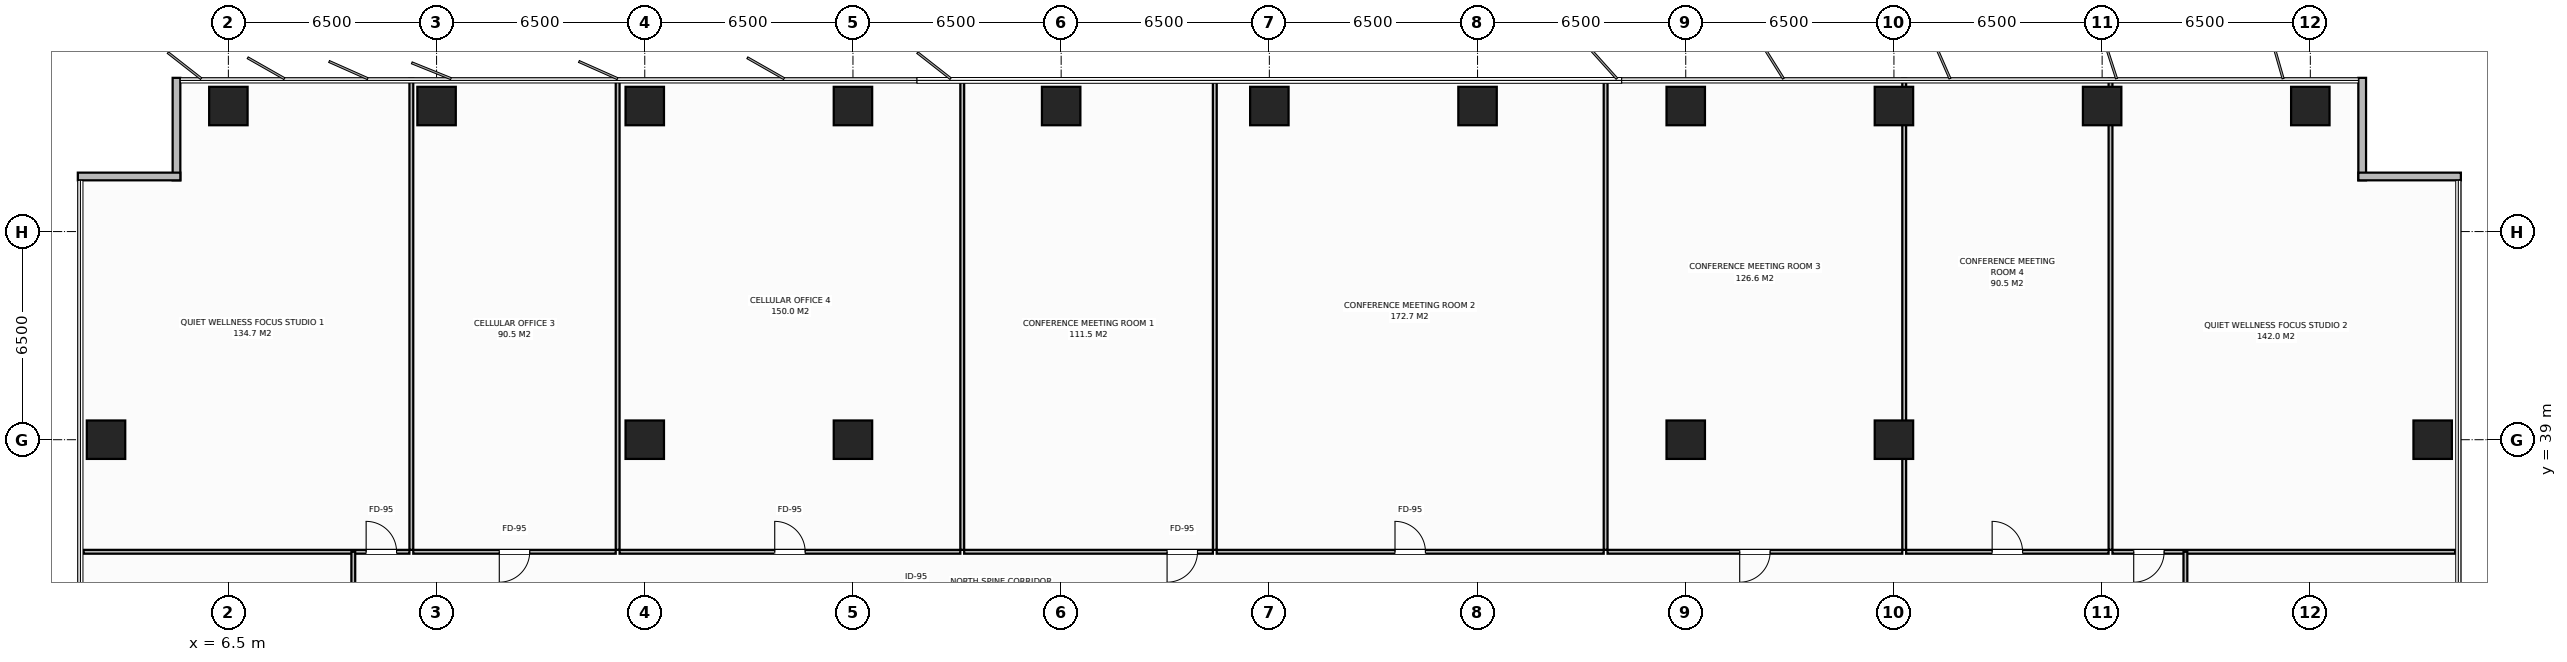
"""IFC4 building model, lengths in metres.
Left out: names, types, materials, properties, quantities, classifications, styles, units other than length and angle.
Written with IfcOpenShell. Run it as: python <this file> out.ifc"""

import sys

from ifc_helpers import new_model, si_unit, direction, frame, frame_2d, origin, origin_2d, place, context, subcontext, project, spatial, rectangle, extrude, element, fill, save


model = new_model("IFC4")
c1 = context("Model", 3, precision=1e-05, world=origin(), true_north=direction((0.0, 1.0)))
c2 = subcontext(c1, "Body", "Model", "MODEL_VIEW")
j1 = project(units=[si_unit("LENGTHUNIT", "METRE"), si_unit("PLANEANGLEUNIT", "RADIAN")], contexts=[c1])
p1 = place(None, origin())
s1 = spatial("IfcSite", under=j1, at=p1, CompositionType="ELEMENT")
p2 = place(p1, origin())
s2 = spatial("IfcBuilding", under=s1, at=p2, CompositionType="ELEMENT")
p3 = place(p2, frame((0.0, 0.0, 116.4)))
s3 = spatial("IfcBuildingStorey", under=s2, at=p3, CompositionType="ELEMENT", Elevation=116.4)
for number, where, z_axis, x_axis in (
    (1, (19.5, 39.0, 0.0), (0.0, 0.0, 1.0), (1.0, 0.0, 0.0)),
    (2, (58.5, 39.0, 0.0), (0.0, 0.0, 1.0), (1.0, 0.0, 0.0)),
    (3, (26.0, 39.0, 0.0), (0.0, 0.0, 1.0), (1.0, 0.0, 0.0)),
    (4, (52.0, 39.0, 0.0), (0.0, 0.0, 1.0), (1.0, 0.0, 0.0)),
    (5, (6.5, 49.42, 0.0), (0.0, 0.0, 1.0), (1.0, 0.0, 0.0)),
    (6, (13.0, 49.42, 0.0), (0.0, 0.0, 1.0), (1.0, 0.0, 0.0)),
    (7, (19.5, 49.42, 0.0), (0.0, 0.0, 1.0), (1.0, 0.0, 0.0)),
    (8, (26.0, 49.42, 0.0), (0.0, 0.0, 1.0), (1.0, 0.0, 0.0)),
    (9, (32.5, 49.42, 0.0), (0.0, 0.0, 1.0), (1.0, 0.0, 0.0)),
    (10, (39.0, 49.42, 0.0), (0.0, 0.0, 1.0), (1.0, 0.0, 0.0)),
    (11, (45.5, 49.42, 0.0), (0.0, 0.0, 1.0), (1.0, 0.0, 0.0)),
    (12, (52.0, 49.42, 0.0), (0.0, 0.0, 1.0), (1.0, 0.0, 0.0)),
    (13, (58.5, 49.42, 0.0), (0.0, 0.0, 1.0), (1.0, 0.0, 0.0)),
    (14, (65.0, 49.42, 0.0), (0.0, 0.0, 1.0), (1.0, 0.0, 0.0)),
    (15, (71.5, 49.42, 0.0), (0.0, 0.0, 1.0), (1.0, 0.0, 0.0)),
    (16, (2.68, 39.0, 0.0), (0.0, 0.0, 1.0), (1.0, 0.0, 0.0)),
    (17, (75.32, 39.0, 0.0), (0.0, 0.0, 1.0), (1.0, 0.0, 0.0)),
):
    element("IfcColumn", number, at=place(p3, frame(where, z_axis=z_axis, x_axis=x_axis)), inside=s3, PredefinedType="COLUMN", context=c2, shape_type="SweptSolid", body=[
        extrude(rectangle(XDim=1.2, YDim=1.2, at=origin_2d()), origin(), (0.0, 0.0, 1.0), 3.8),
    ])
for number, where, z_axis, x_axis in (
    (18, (4.88, 47.1, 0.0), (0.0, 0.0, 1.0), (0.0, 1.0, 0.0)),
    (19, (1.8, 47.22, 0.0), (0.0, 0.0, 1.0), (1.0, 0.0, 0.0)),
    (20, (73.12, 50.3, 0.0), (0.0, 0.0, 1.0), (0.0, -1.0, 0.0)),
    (21, (73.0, 47.22, 0.0), (0.0, 0.0, 1.0), (1.0, 0.0, 0.0)),
):
    element("IfcWall", number, at=place(p3, frame(where, z_axis=z_axis, x_axis=x_axis)), inside=s3, PredefinedType="STANDARD", context=c2, shape_type="SweptSolid", body=[
        extrude(rectangle(XDim=3.2, YDim=0.24, at=frame_2d((1.6, 0.0))), origin(), (0.0, 0.0, 1.0), 3.565),
    ])
p4 = place(p3, frame((12.212, 35.56, 0.0), z_axis=(0.0, 0.0, 1.0), x_axis=(0.0, 1.0, 0.0)))
e22 = element("IfcWall", 22, at=p4, inside=s3, PredefinedType="PARTITIONING", context=c2, shape_type="SweptSolid", body=[
    extrude(rectangle(XDim=14.72, YDim=0.12, at=frame_2d((7.36, 0.0))), origin(), (0.0, 0.0, 1.0), 3.565),
])
p5 = place(p3, frame((1.98, 35.5, 0.0), z_axis=(0.0, 0.0, 1.0), x_axis=(1.0, 0.0, 0.0)))
e23 = element("IfcWall", 23, at=p5, inside=s3, PredefinedType="PARTITIONING", context=c2, shape_type="SweptSolid", body=[
    extrude(rectangle(XDim=10.172, YDim=0.12, at=frame_2d((5.086, 0.0))), origin(), (0.0, 0.0, 1.0), 3.565),
])
p6 = place(p5, frame((8.821, 0.0, 0.0)))
e24 = element("IfcOpeningElement", 24, at=p6, cuts=e23, PredefinedType="OPENING", context=c2, shape_type="SweptSolid", body=[
    extrude(rectangle(XDim=0.95, YDim=2.15, at=frame_2d((0.475, 1.075))), frame((0.0, 0.07, 0.0), z_axis=(0.0, -1.0, 0.0), x_axis=(1.0, 0.0, 0.0)), (0.0, 0.0, 1.0), 0.14),
])
p7 = place(p3, frame((18.654, 35.56, 0.0), z_axis=(0.0, 0.0, 1.0), x_axis=(0.0, 1.0, 0.0)))
e25 = element("IfcWall", 25, at=p7, inside=s3, PredefinedType="PARTITIONING", context=c2, shape_type="SweptSolid", body=[
    extrude(rectangle(XDim=14.72, YDim=0.12, at=frame_2d((7.36, 0.0))), origin(), (0.0, 0.0, 1.0), 3.565),
])
p8 = place(p3, frame((12.272, 35.5, 0.0), z_axis=(0.0, 0.0, 1.0), x_axis=(1.0, 0.0, 0.0)))
e26 = element("IfcWall", 26, at=p8, inside=s3, PredefinedType="PARTITIONING", context=c2, shape_type="SweptSolid", body=[
    extrude(rectangle(XDim=6.322, YDim=0.12, at=frame_2d((3.161, 0.0))), origin(), (0.0, 0.0, 1.0), 3.565),
])
p9 = place(p8, frame((2.686, 0.0, 0.0)))
e27 = element("IfcOpeningElement", 27, at=p9, cuts=e26, PredefinedType="OPENING", context=c2, shape_type="SweptSolid", body=[
    extrude(rectangle(XDim=0.95, YDim=2.15, at=frame_2d((0.475, 1.075))), frame((0.0, 0.07, 0.0), z_axis=(0.0, -1.0, 0.0), x_axis=(1.0, 0.0, 0.0)), (0.0, 0.0, 1.0), 0.14),
])
p10 = place(p3, frame((29.412, 35.56, 0.0), z_axis=(0.0, 0.0, 1.0), x_axis=(0.0, 1.0, 0.0)))
e28 = element("IfcWall", 28, at=p10, inside=s3, PredefinedType="PARTITIONING", context=c2, shape_type="SweptSolid", body=[
    extrude(rectangle(XDim=14.72, YDim=0.12, at=frame_2d((7.36, 0.0))), origin(), (0.0, 0.0, 1.0), 3.565),
])
p11 = place(p3, frame((18.714, 35.5, 0.0), z_axis=(0.0, 0.0, 1.0), x_axis=(1.0, 0.0, 0.0)))
e29 = element("IfcWall", 29, at=p11, inside=s3, PredefinedType="PARTITIONING", context=c2, shape_type="SweptSolid", body=[
    extrude(rectangle(XDim=10.638, YDim=0.12, at=frame_2d((5.319, 0.0))), origin(), (0.0, 0.0, 1.0), 3.565),
])
p12 = place(p11, frame((4.844, 0.0, 0.0)))
e30 = element("IfcOpeningElement", 30, at=p12, cuts=e29, PredefinedType="OPENING", context=c2, shape_type="SweptSolid", body=[
    extrude(rectangle(XDim=0.95, YDim=2.15, at=frame_2d((0.475, 1.075))), frame((0.0, 0.07, 0.0), z_axis=(0.0, -1.0, 0.0), x_axis=(1.0, 0.0, 0.0)), (0.0, 0.0, 1.0), 0.14),
])
p13 = place(p3, frame((37.297, 35.56, 0.0), z_axis=(0.0, 0.0, 1.0), x_axis=(0.0, 1.0, 0.0)))
e31 = element("IfcWall", 31, at=p13, inside=s3, PredefinedType="PARTITIONING", context=c2, shape_type="SweptSolid", body=[
    extrude(rectangle(XDim=14.72, YDim=0.12, at=frame_2d((7.36, 0.0))), origin(), (0.0, 0.0, 1.0), 3.565),
])
p14 = place(p3, frame((29.472, 35.5, 0.0), z_axis=(0.0, 0.0, 1.0), x_axis=(1.0, 0.0, 0.0)))
e32 = element("IfcWall", 32, at=p14, inside=s3, PredefinedType="PARTITIONING", context=c2, shape_type="SweptSolid", body=[
    extrude(rectangle(XDim=7.765, YDim=0.12, at=frame_2d((3.883, 0.0))), origin(), (0.0, 0.0, 1.0), 3.565),
])
p15 = place(p14, frame((6.335, 0.0, 0.0)))
e33 = element("IfcOpeningElement", 33, at=p15, cuts=e32, PredefinedType="OPENING", context=c2, shape_type="SweptSolid", body=[
    extrude(rectangle(XDim=0.95, YDim=2.15, at=frame_2d((0.475, 1.075))), frame((0.0, 0.07, 0.0), z_axis=(0.0, -1.0, 0.0), x_axis=(1.0, 0.0, 0.0)), (0.0, 0.0, 1.0), 0.14),
])
p16 = place(p3, frame((49.499, 35.56, 0.0), z_axis=(0.0, 0.0, 1.0), x_axis=(0.0, 1.0, 0.0)))
e34 = element("IfcWall", 34, at=p16, inside=s3, PredefinedType="PARTITIONING", context=c2, shape_type="SweptSolid", body=[
    extrude(rectangle(XDim=14.72, YDim=0.12, at=frame_2d((7.36, 0.0))), origin(), (0.0, 0.0, 1.0), 3.565),
])
p17 = place(p3, frame((37.357, 35.5, 0.0), z_axis=(0.0, 0.0, 1.0), x_axis=(1.0, 0.0, 0.0)))
e35 = element("IfcWall", 35, at=p17, inside=s3, PredefinedType="PARTITIONING", context=c2, shape_type="SweptSolid", body=[
    extrude(rectangle(XDim=12.082, YDim=0.12, at=frame_2d((6.041, 0.0))), origin(), (0.0, 0.0, 1.0), 3.565),
])
p18 = place(p17, frame((5.566, 0.0, 0.0)))
e36 = element("IfcOpeningElement", 36, at=p18, cuts=e35, PredefinedType="OPENING", context=c2, shape_type="SweptSolid", body=[
    extrude(rectangle(XDim=0.95, YDim=2.15, at=frame_2d((0.475, 1.075))), frame((0.0, 0.07, 0.0), z_axis=(0.0, -1.0, 0.0), x_axis=(1.0, 0.0, 0.0)), (0.0, 0.0, 1.0), 0.14),
])
p19 = place(p3, frame((58.821, 35.56, 0.0), z_axis=(0.0, 0.0, 1.0), x_axis=(0.0, 1.0, 0.0)))
e37 = element("IfcWall", 37, at=p19, inside=s3, PredefinedType="PARTITIONING", context=c2, shape_type="SweptSolid", body=[
    extrude(rectangle(XDim=14.72, YDim=0.12, at=frame_2d((7.36, 0.0))), origin(), (0.0, 0.0, 1.0), 3.565),
])
p20 = place(p3, frame((49.559, 35.5, 0.0), z_axis=(0.0, 0.0, 1.0), x_axis=(1.0, 0.0, 0.0)))
e38 = element("IfcWall", 38, at=p20, inside=s3, PredefinedType="PARTITIONING", context=c2, shape_type="SweptSolid", body=[
    extrude(rectangle(XDim=9.202, YDim=0.12, at=frame_2d((4.601, 0.0))), origin(), (0.0, 0.0, 1.0), 3.565),
])
p21 = place(p20, frame((4.126, 0.0, 0.0)))
e39 = element("IfcOpeningElement", 39, at=p21, cuts=e38, PredefinedType="OPENING", context=c2, shape_type="SweptSolid", body=[
    extrude(rectangle(XDim=0.95, YDim=2.15, at=frame_2d((0.475, 1.075))), frame((0.0, 0.07, 0.0), z_axis=(0.0, -1.0, 0.0), x_axis=(1.0, 0.0, 0.0)), (0.0, 0.0, 1.0), 0.14),
])
p22 = place(p3, frame((65.262, 35.56, 0.0), z_axis=(0.0, 0.0, 1.0), x_axis=(0.0, 1.0, 0.0)))
e40 = element("IfcWall", 40, at=p22, inside=s3, PredefinedType="PARTITIONING", context=c2, shape_type="SweptSolid", body=[
    extrude(rectangle(XDim=14.72, YDim=0.12, at=frame_2d((7.36, 0.0))), origin(), (0.0, 0.0, 1.0), 3.565),
])
p23 = place(p3, frame((58.881, 35.5, 0.0), z_axis=(0.0, 0.0, 1.0), x_axis=(1.0, 0.0, 0.0)))
e41 = element("IfcWall", 41, at=p23, inside=s3, PredefinedType="PARTITIONING", context=c2, shape_type="SweptSolid", body=[
    extrude(rectangle(XDim=6.321, YDim=0.12, at=frame_2d((3.161, 0.0))), origin(), (0.0, 0.0, 1.0), 3.565),
])
p24 = place(p23, frame((2.686, 0.0, 0.0)))
e42 = element("IfcOpeningElement", 42, at=p24, cuts=e41, PredefinedType="OPENING", context=c2, shape_type="SweptSolid", body=[
    extrude(rectangle(XDim=0.95, YDim=2.15, at=frame_2d((0.475, 1.075))), frame((0.0, 0.07, 0.0), z_axis=(0.0, -1.0, 0.0), x_axis=(1.0, 0.0, 0.0)), (0.0, 0.0, 1.0), 0.14),
])
p25 = place(p3, frame((65.322, 35.5, 0.0), z_axis=(0.0, 0.0, 1.0), x_axis=(1.0, 0.0, 0.0)))
e43 = element("IfcWall", 43, at=p25, inside=s3, PredefinedType="PARTITIONING", context=c2, shape_type="SweptSolid", body=[
    extrude(rectangle(XDim=10.698, YDim=0.12, at=frame_2d((5.349, 0.0))), origin(), (0.0, 0.0, 1.0), 3.565),
])
p26 = place(p25, frame((0.664, 0.0, 0.0)))
e44 = element("IfcOpeningElement", 44, at=p26, cuts=e43, PredefinedType="OPENING", context=c2, shape_type="SweptSolid", body=[
    extrude(rectangle(XDim=0.95, YDim=2.15, at=frame_2d((0.475, 1.075))), frame((0.0, 0.07, 0.0), z_axis=(0.0, -1.0, 0.0), x_axis=(1.0, 0.0, 0.0)), (0.0, 0.0, 1.0), 0.14),
])
p27 = place(p3, frame((10.4, 29.167, 0.0), z_axis=(0.0, 0.0, 1.0), x_axis=(0.0, 1.0, 0.0)))
e45 = element("IfcWall", 45, at=p27, inside=s3, PredefinedType="PARTITIONING", context=c2, shape_type="SweptSolid", body=[
    extrude(rectangle(XDim=6.333, YDim=0.12, at=frame_2d((3.167, 0.0))), origin(), (0.0, 0.0, 1.0), 3.565),
])
p28 = place(p27, frame((1.642, 0.0, 0.0)))
e46 = element("IfcOpeningElement", 46, at=p28, cuts=e45, PredefinedType="OPENING", context=c2, shape_type="SweptSolid", body=[
    extrude(rectangle(XDim=0.95, YDim=2.15, at=frame_2d((0.475, 1.075))), frame((0.0, 0.07, 0.0), z_axis=(0.0, -1.0, 0.0), x_axis=(1.0, 0.0, 0.0)), (0.0, 0.0, 1.0), 0.14),
])
p29 = place(p3, frame((67.6, 16.5, 0.0), z_axis=(0.0, 0.0, 1.0), x_axis=(0.0, 1.0, 0.0)))
e47 = element("IfcWall", 47, at=p29, inside=s3, PredefinedType="PARTITIONING", context=c2, shape_type="SweptSolid", body=[
    extrude(rectangle(XDim=19.0, YDim=0.12, at=frame_2d((9.5, 0.0))), origin(), (0.0, 0.0, 1.0), 3.565),
])
p30 = place(p29, frame((9.025, 0.0, 0.0)))
e48 = element("IfcOpeningElement", 48, at=p30, cuts=e47, PredefinedType="OPENING", context=c2, shape_type="SweptSolid", body=[
    extrude(rectangle(XDim=0.95, YDim=2.15, at=frame_2d((0.475, 1.075))), frame((0.0, 0.07, 0.0), z_axis=(0.0, -1.0, 0.0), x_axis=(1.0, 0.0, 0.0)), (0.0, 0.0, 1.0), 0.14),
])
p31 = place(p6, origin())
e49 = element("IfcDoor", 49, at=p31, inside=s3, OperationType="SINGLE_SWING_LEFT", PredefinedType="DOOR", context=c2, shape_type="SweptSolid", body=[
    extrude(rectangle(XDim=0.95, YDim=2.15, at=frame_2d((0.475, 1.075))), frame((0.0, 0.025, 0.0), z_axis=(0.0, -1.0, 0.0), x_axis=(1.0, 0.0, 0.0)), (0.0, 0.0, 1.0), 0.05),
])
fill(e24, e49)
p32 = place(p9, origin())
e50 = element("IfcDoor", 50, at=p32, inside=s3, OperationType="SINGLE_SWING_RIGHT", PredefinedType="DOOR", context=c2, shape_type="SweptSolid", body=[
    extrude(rectangle(XDim=0.95, YDim=2.15, at=frame_2d((0.475, 1.075))), frame((0.0, 0.025, 0.0), z_axis=(0.0, -1.0, 0.0), x_axis=(1.0, 0.0, 0.0)), (0.0, 0.0, 1.0), 0.05),
])
fill(e27, e50)
p33 = place(p12, origin())
e51 = element("IfcDoor", 51, at=p33, inside=s3, OperationType="SINGLE_SWING_LEFT", PredefinedType="DOOR", context=c2, shape_type="SweptSolid", body=[
    extrude(rectangle(XDim=0.95, YDim=2.15, at=frame_2d((0.475, 1.075))), frame((0.0, 0.025, 0.0), z_axis=(0.0, -1.0, 0.0), x_axis=(1.0, 0.0, 0.0)), (0.0, 0.0, 1.0), 0.05),
])
fill(e30, e51)
p34 = place(p15, origin())
e52 = element("IfcDoor", 52, at=p34, inside=s3, OperationType="SINGLE_SWING_RIGHT", PredefinedType="DOOR", context=c2, shape_type="SweptSolid", body=[
    extrude(rectangle(XDim=0.95, YDim=2.15, at=frame_2d((0.475, 1.075))), frame((0.0, 0.025, 0.0), z_axis=(0.0, -1.0, 0.0), x_axis=(1.0, 0.0, 0.0)), (0.0, 0.0, 1.0), 0.05),
])
fill(e33, e52)
p35 = place(p18, origin())
e53 = element("IfcDoor", 53, at=p35, inside=s3, OperationType="SINGLE_SWING_LEFT", PredefinedType="DOOR", context=c2, shape_type="SweptSolid", body=[
    extrude(rectangle(XDim=0.95, YDim=2.15, at=frame_2d((0.475, 1.075))), frame((0.0, 0.025, 0.0), z_axis=(0.0, -1.0, 0.0), x_axis=(1.0, 0.0, 0.0)), (0.0, 0.0, 1.0), 0.05),
])
fill(e36, e53)
p36 = place(p21, origin())
e54 = element("IfcDoor", 54, at=p36, inside=s3, OperationType="SINGLE_SWING_RIGHT", PredefinedType="DOOR", context=c2, shape_type="SweptSolid", body=[
    extrude(rectangle(XDim=0.95, YDim=2.15, at=frame_2d((0.475, 1.075))), frame((0.0, 0.025, 0.0), z_axis=(0.0, -1.0, 0.0), x_axis=(1.0, 0.0, 0.0)), (0.0, 0.0, 1.0), 0.05),
])
fill(e39, e54)
p37 = place(p24, origin())
e55 = element("IfcDoor", 55, at=p37, inside=s3, OperationType="SINGLE_SWING_LEFT", PredefinedType="DOOR", context=c2, shape_type="SweptSolid", body=[
    extrude(rectangle(XDim=0.95, YDim=2.15, at=frame_2d((0.475, 1.075))), frame((0.0, 0.025, 0.0), z_axis=(0.0, -1.0, 0.0), x_axis=(1.0, 0.0, 0.0)), (0.0, 0.0, 1.0), 0.05),
])
fill(e42, e55)
p38 = place(p26, origin())
e56 = element("IfcDoor", 56, at=p38, inside=s3, OperationType="SINGLE_SWING_RIGHT", PredefinedType="DOOR", context=c2, shape_type="SweptSolid", body=[
    extrude(rectangle(XDim=0.95, YDim=2.15, at=frame_2d((0.475, 1.075))), frame((0.0, 0.025, 0.0), z_axis=(0.0, -1.0, 0.0), x_axis=(1.0, 0.0, 0.0)), (0.0, 0.0, 1.0), 0.05),
])
fill(e44, e56)
save(model, sys.argv[1])
